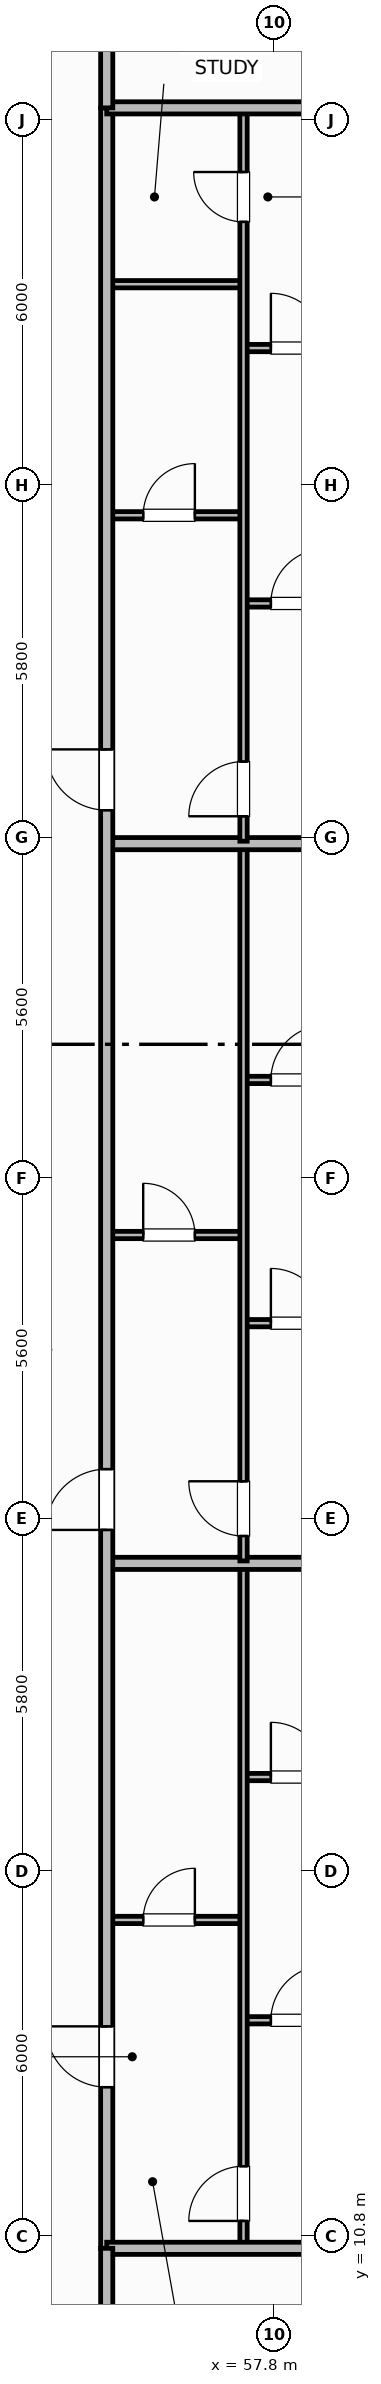
"""IFC4 building model, lengths in metres.
Left out: names, types, materials, properties, quantities, classifications, styles, units other than length and angle.
Written with IfcOpenShell. Run it as: python <this file> out.ifc"""

import sys

from ifc_helpers import new_model, si_unit, direction, frame, frame_2d, origin, place, context, subcontext, project, spatial, rectangle, extrude, element, fill, save


model = new_model("IFC4")
c1 = context("Model", 3, precision=1e-05, world=origin(), true_north=direction((0.0, 1.0)))
c2 = subcontext(c1, "Body", "Model", "MODEL_VIEW")
j1 = project(units=[si_unit("LENGTHUNIT", "METRE"), si_unit("PLANEANGLEUNIT", "RADIAN")], contexts=[c1])
p1 = place(None, origin())
s1 = spatial("IfcSite", under=j1, at=p1, CompositionType="ELEMENT")
p2 = place(p1, origin())
s2 = spatial("IfcBuilding", under=s1, at=p2, CompositionType="ELEMENT")
p3 = place(p2, frame((0.0, 0.0, 92.0)))
s3 = spatial("IfcBuildingStorey", under=s2, at=p3, CompositionType="ELEMENT", Elevation=92.0)
p4 = place(p3, frame((55.05, 16.0, 0.0), z_axis=(0.0, 0.0, 1.0), x_axis=(1.0, 0.0, 0.0)))
e1 = element("IfcWall", 1, at=p4, inside=s3, PredefinedType="PARTITIONING", context=c2, shape_type="SweptSolid", body=[
    extrude(rectangle(XDim=2.25, YDim=0.12, at=frame_2d((1.125, 0.0))), origin(), (0.0, 0.0, 1.0), 2.53),
])
p5 = place(p4, frame((0.6, 0.0, 0.0)))
e2 = element("IfcOpeningElement", 2, at=p5, cuts=e1, PredefinedType="OPENING", context=c2, shape_type="SweptSolid", body=[
    extrude(rectangle(XDim=0.85, YDim=2.1, at=frame_2d((0.425, 1.05))), frame((0.0, 0.07, 0.0), z_axis=(0.0, -1.0, 0.0), x_axis=(1.0, 0.0, 0.0)), (0.0, 0.0, 1.0), 0.14),
])
p6 = place(p3, frame((57.3, 14.35, 0.0), z_axis=(0.0, 0.0, 1.0), x_axis=(1.0, 0.0, 0.0)))
e3 = element("IfcWall", 3, at=p6, inside=s3, PredefinedType="PARTITIONING", context=c2, shape_type="SweptSolid", body=[
    extrude(rectangle(XDim=6.53, YDim=0.12, at=frame_2d((3.265, 0.0))), origin(), (0.0, 0.0, 1.0), 2.53),
])
p7 = place(p6, frame((0.45, 0.0, 0.0)))
e4 = element("IfcOpeningElement", 4, at=p7, cuts=e3, PredefinedType="OPENING", context=c2, shape_type="SweptSolid", body=[
    extrude(rectangle(XDim=0.9, YDim=2.1, at=frame_2d((0.45, 1.05))), frame((0.0, 0.07, 0.0), z_axis=(0.0, -1.0, 0.0), x_axis=(1.0, 0.0, 0.0)), (0.0, 0.0, 1.0), 0.14),
])
p8 = place(p3, frame((57.3, 18.35, 0.0), z_axis=(0.0, 0.0, 1.0), x_axis=(1.0, 0.0, 0.0)))
e5 = element("IfcWall", 5, at=p8, inside=s3, PredefinedType="PARTITIONING", context=c2, shape_type="SweptSolid", body=[
    extrude(rectangle(XDim=6.53, YDim=0.12, at=frame_2d((3.265, 0.0))), origin(), (0.0, 0.0, 1.0), 2.53),
])
p9 = place(p8, frame((0.45, 0.0, 0.0)))
e6 = element("IfcOpeningElement", 6, at=p9, cuts=e5, PredefinedType="OPENING", context=c2, shape_type="SweptSolid", body=[
    extrude(rectangle(XDim=0.9, YDim=2.1, at=frame_2d((0.45, 1.05))), frame((0.0, 0.07, 0.0), z_axis=(0.0, -1.0, 0.0), x_axis=(1.0, 0.0, 0.0)), (0.0, 0.0, 1.0), 0.14),
])
p10 = place(p3, frame((57.3, 10.64, 0.0), z_axis=(0.0, 0.0, 1.0), x_axis=(0.0, 1.0, 0.0)))
e7 = element("IfcWall", 7, at=p10, inside=s3, PredefinedType="PARTITIONING", context=c2, shape_type="SweptSolid", body=[
    extrude(rectangle(XDim=11.184, YDim=0.12, at=frame_2d((5.592, 0.0))), origin(), (0.0, 0.0, 1.0), 2.53),
])
p11 = place(p10, frame((0.41, 0.0, 0.0)))
e8 = element("IfcOpeningElement", 8, at=p11, cuts=e7, PredefinedType="OPENING", context=c2, shape_type="SweptSolid", body=[
    extrude(rectangle(XDim=0.9, YDim=2.1, at=frame_2d((0.45, 1.05))), frame((0.0, 0.07, 0.0), z_axis=(0.0, -1.0, 0.0), x_axis=(1.0, 0.0, 0.0)), (0.0, 0.0, 1.0), 0.14),
])
p12 = place(p3, frame((55.05, 21.864, 0.0), z_axis=(0.0, 0.0, 1.0), x_axis=(1.0, 0.0, 0.0)))
e9 = element("IfcWall", 9, at=p12, inside=s3, PredefinedType="PARTITIONING", context=c2, shape_type="SweptSolid", body=[
    extrude(rectangle(XDim=8.78, YDim=0.2, at=frame_2d((4.39, 0.0))), origin(), (0.0, 0.0, 1.0), 2.53),
])
p13 = place(p3, frame((55.05, 27.264, 0.0), z_axis=(0.0, 0.0, 1.0), x_axis=(1.0, 0.0, 0.0)))
e10 = element("IfcWall", 10, at=p13, inside=s3, PredefinedType="PARTITIONING", context=c2, shape_type="SweptSolid", body=[
    extrude(rectangle(XDim=2.25, YDim=0.12, at=frame_2d((1.125, 0.0))), origin(), (0.0, 0.0, 1.0), 2.53),
])
p14 = place(p13, frame((0.6, 0.0, 0.0)))
e11 = element("IfcOpeningElement", 11, at=p14, cuts=e10, PredefinedType="OPENING", context=c2, shape_type="SweptSolid", body=[
    extrude(rectangle(XDim=0.85, YDim=2.1, at=frame_2d((0.425, 1.05))), frame((0.0, 0.07, 0.0), z_axis=(0.0, -1.0, 0.0), x_axis=(1.0, 0.0, 0.0)), (0.0, 0.0, 1.0), 0.14),
])
p15 = place(p3, frame((57.3, 25.814, 0.0), z_axis=(0.0, 0.0, 1.0), x_axis=(1.0, 0.0, 0.0)))
e12 = element("IfcWall", 12, at=p15, inside=s3, PredefinedType="PARTITIONING", context=c2, shape_type="SweptSolid", body=[
    extrude(rectangle(XDim=5.981, YDim=0.12, at=frame_2d((2.99, 0.0))), origin(), (0.0, 0.0, 1.0), 2.53),
])
p16 = place(p15, frame((0.45, 0.0, 0.0)))
e13 = element("IfcOpeningElement", 13, at=p16, cuts=e12, PredefinedType="OPENING", context=c2, shape_type="SweptSolid", body=[
    extrude(rectangle(XDim=0.9, YDim=2.1, at=frame_2d((0.45, 1.05))), frame((0.0, 0.07, 0.0), z_axis=(0.0, -1.0, 0.0), x_axis=(1.0, 0.0, 0.0)), (0.0, 0.0, 1.0), 0.14),
])
p17 = place(p3, frame((57.3, 29.814, 0.0), z_axis=(0.0, 0.0, 1.0), x_axis=(1.0, 0.0, 0.0)))
e14 = element("IfcWall", 14, at=p17, inside=s3, PredefinedType="PARTITIONING", context=c2, shape_type="SweptSolid", body=[
    extrude(rectangle(XDim=6.181, YDim=0.12, at=frame_2d((3.091, 0.0))), origin(), (0.0, 0.0, 1.0), 2.53),
])
p18 = place(p17, frame((0.45, 0.0, 0.0)))
e15 = element("IfcOpeningElement", 15, at=p18, cuts=e14, PredefinedType="OPENING", context=c2, shape_type="SweptSolid", body=[
    extrude(rectangle(XDim=0.9, YDim=2.1, at=frame_2d((0.45, 1.05))), frame((0.0, 0.07, 0.0), z_axis=(0.0, -1.0, 0.0), x_axis=(1.0, 0.0, 0.0)), (0.0, 0.0, 1.0), 0.14),
])
p19 = place(p3, frame((57.3, 21.904, 0.0), z_axis=(0.0, 0.0, 1.0), x_axis=(0.0, 1.0, 0.0)))
e16 = element("IfcWall", 16, at=p19, inside=s3, PredefinedType="PARTITIONING", context=c2, shape_type="SweptSolid", body=[
    extrude(rectangle(XDim=11.756, YDim=0.12, at=frame_2d((5.878, 0.0))), origin(), (0.0, 0.0, 1.0), 2.53),
])
p20 = place(p19, frame((0.41, 0.0, 0.0)))
e17 = element("IfcOpeningElement", 17, at=p20, cuts=e16, PredefinedType="OPENING", context=c2, shape_type="SweptSolid", body=[
    extrude(rectangle(XDim=0.9, YDim=2.1, at=frame_2d((0.45, 1.05))), frame((0.0, 0.07, 0.0), z_axis=(0.0, -1.0, 0.0), x_axis=(1.0, 0.0, 0.0)), (0.0, 0.0, 1.0), 0.14),
])
p21 = place(p3, frame((55.05, 33.7, 0.0), z_axis=(0.0, 0.0, 1.0), x_axis=(1.0, 0.0, 0.0)))
e18 = element("IfcWall", 18, at=p21, inside=s3, PredefinedType="PARTITIONING", context=c2, shape_type="SweptSolid", body=[
    extrude(rectangle(XDim=8.78, YDim=0.2, at=frame_2d((4.39, 0.0))), origin(), (0.0, 0.0, 1.0), 2.53),
])
p22 = place(p3, frame((55.05, 39.1, 0.0), z_axis=(0.0, 0.0, 1.0), x_axis=(1.0, 0.0, 0.0)))
e19 = element("IfcWall", 19, at=p22, inside=s3, PredefinedType="PARTITIONING", context=c2, shape_type="SweptSolid", body=[
    extrude(rectangle(XDim=2.25, YDim=0.12, at=frame_2d((1.125, 0.0))), origin(), (0.0, 0.0, 1.0), 2.53),
])
p23 = place(p22, frame((0.6, 0.0, 0.0)))
e20 = element("IfcOpeningElement", 20, at=p23, cuts=e19, PredefinedType="OPENING", context=c2, shape_type="SweptSolid", body=[
    extrude(rectangle(XDim=0.85, YDim=2.1, at=frame_2d((0.425, 1.05))), frame((0.0, 0.07, 0.0), z_axis=(0.0, -1.0, 0.0), x_axis=(1.0, 0.0, 0.0)), (0.0, 0.0, 1.0), 0.14),
])
p24 = place(p3, frame((55.05, 42.9, 0.0), z_axis=(0.0, 0.0, 1.0), x_axis=(1.0, 0.0, 0.0)))
e21 = element("IfcWall", 21, at=p24, inside=s3, PredefinedType="PARTITIONING", context=c2, shape_type="SweptSolid", body=[
    extrude(rectangle(XDim=2.25, YDim=0.12, at=frame_2d((1.125, 0.0))), origin(), (0.0, 0.0, 1.0), 2.53),
])
p25 = place(p3, frame((57.3, 37.65, 0.0), z_axis=(0.0, 0.0, 1.0), x_axis=(1.0, 0.0, 0.0)))
e22 = element("IfcWall", 22, at=p25, inside=s3, PredefinedType="PARTITIONING", context=c2, shape_type="SweptSolid", body=[
    extrude(rectangle(XDim=6.53, YDim=0.12, at=frame_2d((3.265, 0.0))), origin(), (0.0, 0.0, 1.0), 2.53),
])
p26 = place(p25, frame((0.45, 0.0, 0.0)))
e23 = element("IfcOpeningElement", 23, at=p26, cuts=e22, PredefinedType="OPENING", context=c2, shape_type="SweptSolid", body=[
    extrude(rectangle(XDim=0.9, YDim=2.1, at=frame_2d((0.45, 1.05))), frame((0.0, 0.07, 0.0), z_axis=(0.0, -1.0, 0.0), x_axis=(1.0, 0.0, 0.0)), (0.0, 0.0, 1.0), 0.14),
])
p27 = place(p3, frame((57.3, 41.85, 0.0), z_axis=(0.0, 0.0, 1.0), x_axis=(1.0, 0.0, 0.0)))
e24 = element("IfcWall", 24, at=p27, inside=s3, PredefinedType="PARTITIONING", context=c2, shape_type="SweptSolid", body=[
    extrude(rectangle(XDim=6.53, YDim=0.12, at=frame_2d((3.265, 0.0))), origin(), (0.0, 0.0, 1.0), 2.53),
])
p28 = place(p27, frame((0.45, 0.0, 0.0)))
e25 = element("IfcOpeningElement", 25, at=p28, cuts=e24, PredefinedType="OPENING", context=c2, shape_type="SweptSolid", body=[
    extrude(rectangle(XDim=0.9, YDim=2.1, at=frame_2d((0.45, 1.05))), frame((0.0, 0.07, 0.0), z_axis=(0.0, -1.0, 0.0), x_axis=(1.0, 0.0, 0.0)), (0.0, 0.0, 1.0), 0.14),
])
p29 = place(p3, frame((57.3, 33.74, 0.0), z_axis=(0.0, 0.0, 1.0), x_axis=(0.0, 1.0, 0.0)))
e26 = element("IfcWall", 26, at=p29, inside=s3, PredefinedType="PARTITIONING", context=c2, shape_type="SweptSolid", body=[
    extrude(rectangle(XDim=12.02, YDim=0.12, at=frame_2d((6.01, 0.0))), origin(), (0.0, 0.0, 1.0), 2.53),
])
p30 = place(p29, frame((0.41, 0.0, 0.0)))
e27 = element("IfcOpeningElement", 27, at=p30, cuts=e26, PredefinedType="OPENING", context=c2, shape_type="SweptSolid", body=[
    extrude(rectangle(XDim=0.9, YDim=2.1, at=frame_2d((0.45, 1.05))), frame((0.0, 0.07, 0.0), z_axis=(0.0, -1.0, 0.0), x_axis=(1.0, 0.0, 0.0)), (0.0, 0.0, 1.0), 0.14),
])
p31 = place(p29, frame((10.185, 0.0, 0.0)))
e28 = element("IfcOpeningElement", 28, at=p31, cuts=e26, PredefinedType="OPENING", context=c2, shape_type="SweptSolid", body=[
    extrude(rectangle(XDim=0.82, YDim=2.08, at=frame_2d((0.41, 1.04))), frame((0.0, 0.07, 0.0), z_axis=(0.0, -1.0, 0.0), x_axis=(1.0, 0.0, 0.0)), (0.0, 0.0, 1.0), 0.14),
])
p32 = place(p3, frame((55.05, 10.6, 0.0), z_axis=(0.0, 0.0, 1.0), x_axis=(0.0, 1.0, 0.0)))
e29 = element("IfcWall", 29, at=p32, inside=s3, PredefinedType="PARTITIONING", context=c2, shape_type="SweptSolid", body=[
    extrude(rectangle(XDim=35.2, YDim=0.2, at=frame_2d((17.6, 0.0))), origin(), (0.0, 0.0, 1.0), 2.53),
])
p33 = place(p32, frame((2.65, 0.0, 0.0)))
e30 = element("IfcOpeningElement", 30, at=p33, cuts=e29, PredefinedType="OPENING", context=c2, shape_type="SweptSolid", body=[
    extrude(rectangle(XDim=1.0, YDim=2.15, at=frame_2d((0.5, 1.075))), frame((0.0, 0.11, 0.0), z_axis=(0.0, -1.0, 0.0), x_axis=(1.0, 0.0, 0.0)), (0.0, 0.0, 1.0), 0.22),
])
p34 = place(p32, frame((11.814, 0.0, 0.0)))
e31 = element("IfcOpeningElement", 31, at=p34, cuts=e29, PredefinedType="OPENING", context=c2, shape_type="SweptSolid", body=[
    extrude(rectangle(XDim=1.0, YDim=2.15, at=frame_2d((0.5, 1.075))), frame((0.0, 0.11, 0.0), z_axis=(0.0, -1.0, 0.0), x_axis=(1.0, 0.0, 0.0)), (0.0, 0.0, 1.0), 0.22),
])
p35 = place(p32, frame((23.65, 0.0, 0.0)))
e32 = element("IfcOpeningElement", 32, at=p35, cuts=e29, PredefinedType="OPENING", context=c2, shape_type="SweptSolid", body=[
    extrude(rectangle(XDim=1.0, YDim=2.15, at=frame_2d((0.5, 1.075))), frame((0.0, 0.11, 0.0), z_axis=(0.0, -1.0, 0.0), x_axis=(1.0, 0.0, 0.0)), (0.0, 0.0, 1.0), 0.22),
])
for number, where, z_axis, x_axis in (
    (33, (55.05, 10.6, 0.0), (0.0, 0.0, 1.0), (1.0, 0.0, 0.0)),
    (34, (55.05, 45.8, 0.0), (0.0, 0.0, 1.0), (1.0, 0.0, 0.0)),
):
    element("IfcWall", number, at=place(p3, frame(where, z_axis=z_axis, x_axis=x_axis)), inside=s3, PredefinedType="PARTITIONING", context=c2, shape_type="SweptSolid", body=[
        extrude(rectangle(XDim=8.36, YDim=0.2, at=frame_2d((4.18, 0.0))), origin(), (0.0, 0.0, 1.0), 2.53),
    ])
p36 = place(p3, frame((55.05, 4.97, 0.0), z_axis=(0.0, 0.0, 1.0), x_axis=(0.0, 1.0, 0.0)))
e35 = element("IfcWall", 35, at=p36, inside=s3, PredefinedType="PARTITIONING", context=c2, shape_type="SweptSolid", body=[
    extrude(rectangle(XDim=5.63, YDim=0.2, at=frame_2d((2.815, 0.0))), origin(), (0.0, 0.0, 1.0), 2.53),
])
p37 = place(p3, frame((55.05, 45.8, 0.0), z_axis=(0.0, 0.0, 1.0), x_axis=(0.0, 1.0, 0.0)))
e36 = element("IfcWall", 36, at=p37, inside=s3, PredefinedType="PARTITIONING", context=c2, shape_type="SweptSolid", body=[
    extrude(rectangle(XDim=5.63, YDim=0.2, at=frame_2d((2.815, 0.0))), origin(), (0.0, 0.0, 1.0), 2.53),
])
p38 = place(p5, origin())
e37 = element("IfcDoor", 37, at=p38, inside=s3, OperationType="SINGLE_SWING_RIGHT", PredefinedType="DOOR", context=c2, shape_type="SweptSolid", body=[
    extrude(rectangle(XDim=0.85, YDim=2.1, at=frame_2d((0.425, 1.05))), frame((0.0, 0.025, 0.0), z_axis=(0.0, -1.0, 0.0), x_axis=(1.0, 0.0, 0.0)), (0.0, 0.0, 1.0), 0.05),
])
fill(e2, e37)
p39 = place(p7, origin())
e38 = element("IfcDoor", 38, at=p39, inside=s3, OperationType="SINGLE_SWING_RIGHT", PredefinedType="DOOR", context=c2, shape_type="SweptSolid", body=[
    extrude(rectangle(XDim=0.9, YDim=2.1, at=frame_2d((0.45, 1.05))), frame((0.0, 0.025, 0.0), z_axis=(0.0, -1.0, 0.0), x_axis=(1.0, 0.0, 0.0)), (0.0, 0.0, 1.0), 0.05),
])
fill(e4, e38)
p40 = place(p9, origin())
e39 = element("IfcDoor", 39, at=p40, inside=s3, OperationType="SINGLE_SWING_LEFT", PredefinedType="DOOR", context=c2, shape_type="SweptSolid", body=[
    extrude(rectangle(XDim=0.9, YDim=2.1, at=frame_2d((0.45, 1.05))), frame((0.0, 0.025, 0.0), z_axis=(0.0, -1.0, 0.0), x_axis=(1.0, 0.0, 0.0)), (0.0, 0.0, 1.0), 0.05),
])
fill(e6, e39)
p41 = place(p11, origin())
e40 = element("IfcDoor", 40, at=p41, inside=s3, OperationType="SINGLE_SWING_LEFT", PredefinedType="DOOR", context=c2, shape_type="SweptSolid", body=[
    extrude(rectangle(XDim=0.9, YDim=2.1, at=frame_2d((0.45, 1.05))), frame((0.0, 0.025, 0.0), z_axis=(0.0, -1.0, 0.0), x_axis=(1.0, 0.0, 0.0)), (0.0, 0.0, 1.0), 0.05),
])
fill(e8, e40)
p42 = place(p14, origin())
e41 = element("IfcDoor", 41, at=p42, inside=s3, OperationType="SINGLE_SWING_LEFT", PredefinedType="DOOR", context=c2, shape_type="SweptSolid", body=[
    extrude(rectangle(XDim=0.85, YDim=2.1, at=frame_2d((0.425, 1.05))), frame((0.0, 0.025, 0.0), z_axis=(0.0, -1.0, 0.0), x_axis=(1.0, 0.0, 0.0)), (0.0, 0.0, 1.0), 0.05),
])
fill(e11, e41)
p43 = place(p16, origin())
e42 = element("IfcDoor", 42, at=p43, inside=s3, OperationType="SINGLE_SWING_LEFT", PredefinedType="DOOR", context=c2, shape_type="SweptSolid", body=[
    extrude(rectangle(XDim=0.9, YDim=2.1, at=frame_2d((0.45, 1.05))), frame((0.0, 0.025, 0.0), z_axis=(0.0, -1.0, 0.0), x_axis=(1.0, 0.0, 0.0)), (0.0, 0.0, 1.0), 0.05),
])
fill(e13, e42)
p44 = place(p18, origin())
e43 = element("IfcDoor", 43, at=p44, inside=s3, OperationType="SINGLE_SWING_RIGHT", PredefinedType="DOOR", context=c2, shape_type="SweptSolid", body=[
    extrude(rectangle(XDim=0.9, YDim=2.1, at=frame_2d((0.45, 1.05))), frame((0.0, 0.025, 0.0), z_axis=(0.0, -1.0, 0.0), x_axis=(1.0, 0.0, 0.0)), (0.0, 0.0, 1.0), 0.05),
])
fill(e15, e43)
p45 = place(p20, origin())
e44 = element("IfcDoor", 44, at=p45, inside=s3, OperationType="SINGLE_SWING_RIGHT", PredefinedType="DOOR", context=c2, shape_type="SweptSolid", body=[
    extrude(rectangle(XDim=0.9, YDim=2.1, at=frame_2d((0.45, 1.05))), frame((0.0, 0.025, 0.0), z_axis=(0.0, -1.0, 0.0), x_axis=(1.0, 0.0, 0.0)), (0.0, 0.0, 1.0), 0.05),
])
fill(e17, e44)
p46 = place(p23, origin())
e45 = element("IfcDoor", 45, at=p46, inside=s3, OperationType="SINGLE_SWING_RIGHT", PredefinedType="DOOR", context=c2, shape_type="SweptSolid", body=[
    extrude(rectangle(XDim=0.85, YDim=2.1, at=frame_2d((0.425, 1.05))), frame((0.0, 0.025, 0.0), z_axis=(0.0, -1.0, 0.0), x_axis=(1.0, 0.0, 0.0)), (0.0, 0.0, 1.0), 0.05),
])
fill(e20, e45)
p47 = place(p26, origin())
e46 = element("IfcDoor", 46, at=p47, inside=s3, OperationType="SINGLE_SWING_RIGHT", PredefinedType="DOOR", context=c2, shape_type="SweptSolid", body=[
    extrude(rectangle(XDim=0.9, YDim=2.1, at=frame_2d((0.45, 1.05))), frame((0.0, 0.025, 0.0), z_axis=(0.0, -1.0, 0.0), x_axis=(1.0, 0.0, 0.0)), (0.0, 0.0, 1.0), 0.05),
])
fill(e23, e46)
p48 = place(p28, origin())
e47 = element("IfcDoor", 47, at=p48, inside=s3, OperationType="SINGLE_SWING_LEFT", PredefinedType="DOOR", context=c2, shape_type="SweptSolid", body=[
    extrude(rectangle(XDim=0.9, YDim=2.1, at=frame_2d((0.45, 1.05))), frame((0.0, 0.025, 0.0), z_axis=(0.0, -1.0, 0.0), x_axis=(1.0, 0.0, 0.0)), (0.0, 0.0, 1.0), 0.05),
])
fill(e25, e47)
p49 = place(p30, origin())
e48 = element("IfcDoor", 48, at=p49, inside=s3, OperationType="SINGLE_SWING_LEFT", PredefinedType="DOOR", context=c2, shape_type="SweptSolid", body=[
    extrude(rectangle(XDim=0.9, YDim=2.1, at=frame_2d((0.45, 1.05))), frame((0.0, 0.025, 0.0), z_axis=(0.0, -1.0, 0.0), x_axis=(1.0, 0.0, 0.0)), (0.0, 0.0, 1.0), 0.05),
])
fill(e27, e48)
p50 = place(p31, origin())
e49 = element("IfcDoor", 49, at=p50, inside=s3, OperationType="SINGLE_SWING_RIGHT", PredefinedType="DOOR", context=c2, shape_type="SweptSolid", body=[
    extrude(rectangle(XDim=0.82, YDim=2.08, at=frame_2d((0.41, 1.04))), frame((0.0, 0.025, 0.0), z_axis=(0.0, -1.0, 0.0), x_axis=(1.0, 0.0, 0.0)), (0.0, 0.0, 1.0), 0.05),
])
fill(e28, e49)
p51 = place(p33, origin())
e50 = element("IfcDoor", 50, at=p51, inside=s3, OperationType="SINGLE_SWING_RIGHT", PredefinedType="DOOR", context=c2, shape_type="SweptSolid", body=[
    extrude(rectangle(XDim=1.0, YDim=2.15, at=frame_2d((0.5, 1.075))), frame((0.0, 0.025, 0.0), z_axis=(0.0, -1.0, 0.0), x_axis=(1.0, 0.0, 0.0)), (0.0, 0.0, 1.0), 0.05),
])
fill(e30, e50)
p52 = place(p34, origin())
e51 = element("IfcDoor", 51, at=p52, inside=s3, OperationType="SINGLE_SWING_LEFT", PredefinedType="DOOR", context=c2, shape_type="SweptSolid", body=[
    extrude(rectangle(XDim=1.0, YDim=2.15, at=frame_2d((0.5, 1.075))), frame((0.0, 0.025, 0.0), z_axis=(0.0, -1.0, 0.0), x_axis=(1.0, 0.0, 0.0)), (0.0, 0.0, 1.0), 0.05),
])
fill(e31, e51)
p53 = place(p35, origin())
e52 = element("IfcDoor", 52, at=p53, inside=s3, OperationType="SINGLE_SWING_RIGHT", PredefinedType="DOOR", context=c2, shape_type="SweptSolid", body=[
    extrude(rectangle(XDim=1.0, YDim=2.15, at=frame_2d((0.5, 1.075))), frame((0.0, 0.025, 0.0), z_axis=(0.0, -1.0, 0.0), x_axis=(1.0, 0.0, 0.0)), (0.0, 0.0, 1.0), 0.05),
])
fill(e32, e52)
save(model, sys.argv[1])
